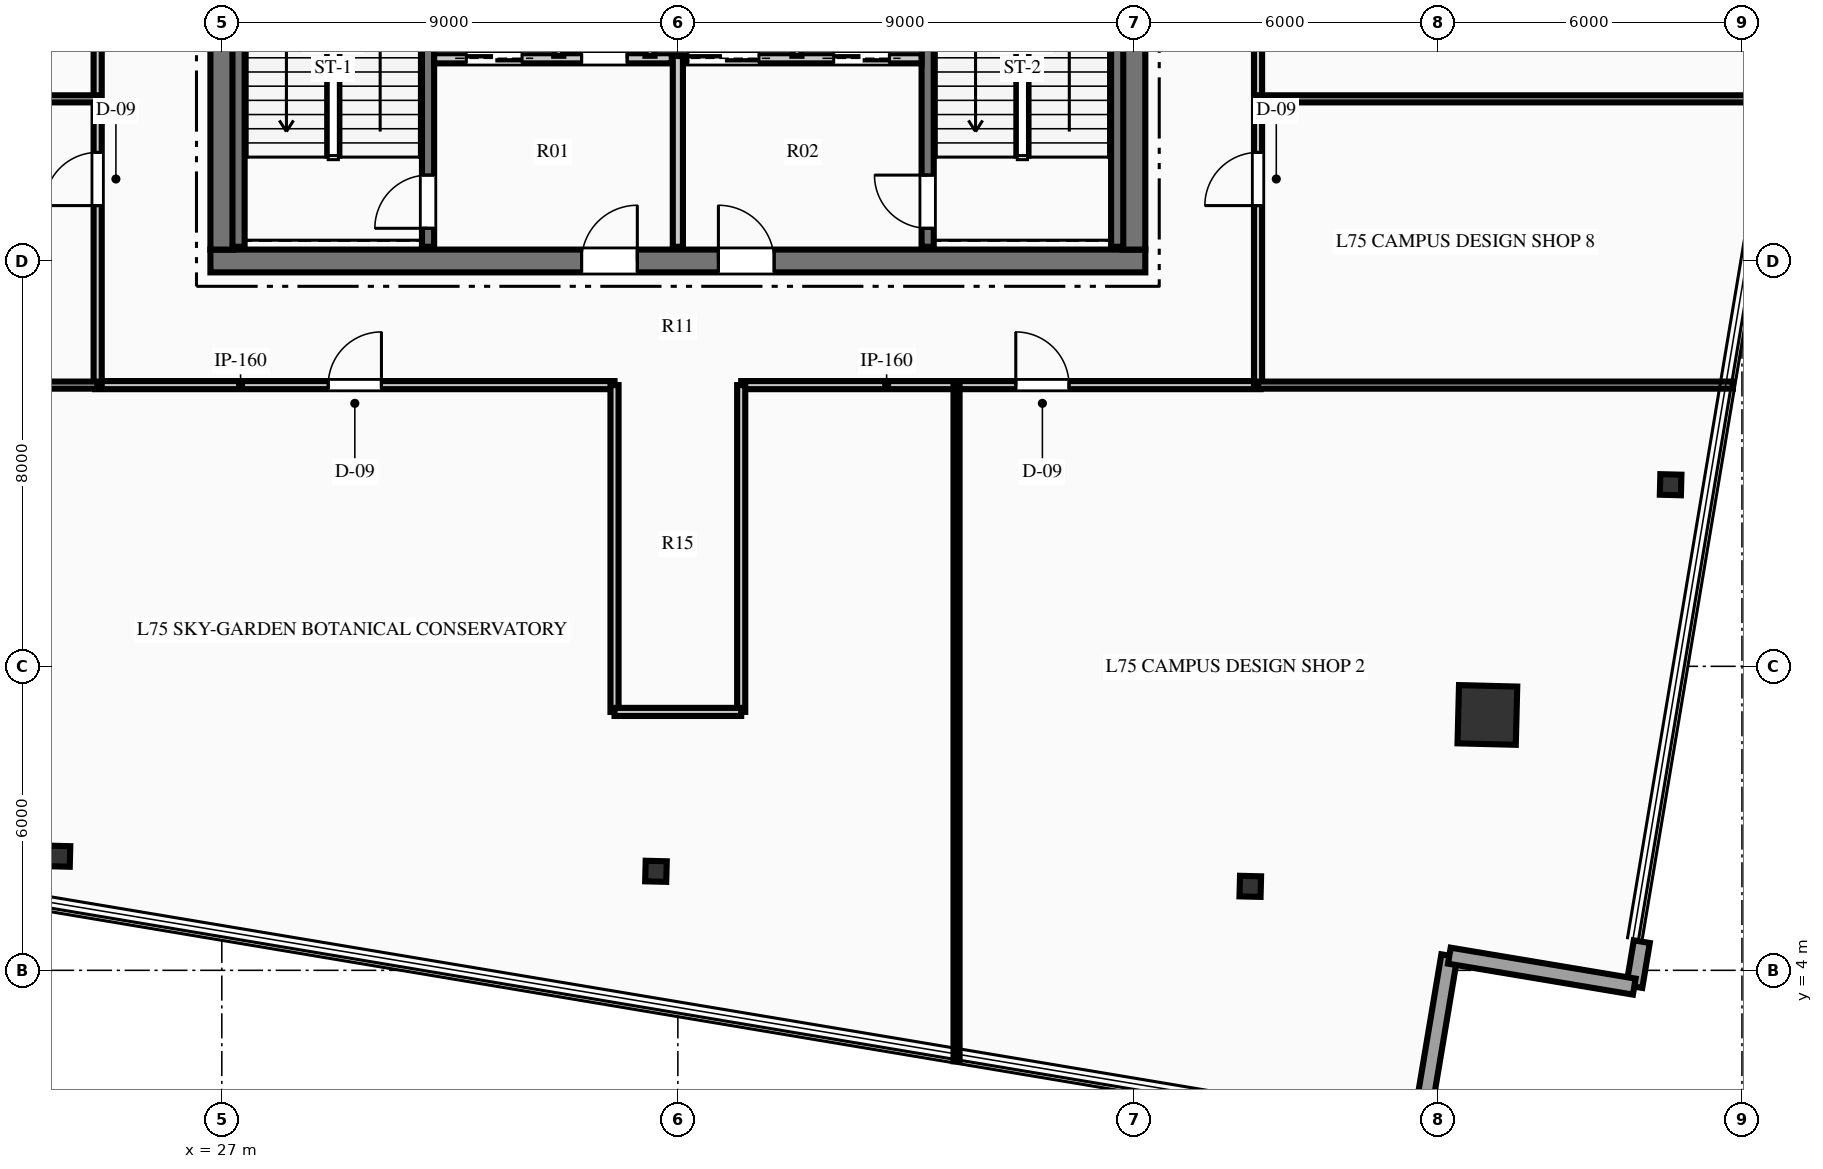
"""IFC4 building model, lengths in metres.
Left out: names, types, materials, properties, quantities, classifications, styles, units other than length and angle.
Written with IfcOpenShell. Run it as: python <this file> out.ifc"""

import sys

from ifc_helpers import new_model, si_unit, direction, frame, frame_2d, origin, origin_2d, place, context, subcontext, project, spatial, rectangle, hollow_rectangle, i_section, extrude, element, fill, save


model = new_model("IFC4")
c1 = context("Model", 3, precision=1e-05, world=origin(), true_north=direction((0.0, 1.0)))
c2 = subcontext(c1, "Body", "Model", "MODEL_VIEW")
j1 = project(units=[si_unit("LENGTHUNIT", "METRE"), si_unit("PLANEANGLEUNIT", "RADIAN")], contexts=[c1])
p1 = place(None, origin())
s1 = spatial("IfcSite", under=j1, at=p1, CompositionType="ELEMENT")
p2 = place(p1, origin())
s2 = spatial("IfcBuilding", under=s1, at=p2, CompositionType="ELEMENT")
p3 = place(p2, frame((0.0, 0.0, 298.2)))
s3 = spatial("IfcBuildingStorey", under=s2, at=p3, CompositionType="ELEMENT", Elevation=298.2)
p4 = place(p3, frame((26.775, 18.0, 0.0), z_axis=(0.0, 0.0, 1.0), x_axis=(1.0, 0.0, 0.0)))
e1 = element("IfcWall", 1, at=p4, inside=s3, PredefinedType="SHEAR", context=c2, shape_type="SweptSolid", body=[
    extrude(rectangle(XDim=18.45, YDim=0.45, at=frame_2d((9.225, 0.0))), origin(), (0.0, 0.0, 1.0), 4.5),
])
p5 = place(p4, frame((7.325, 0.0, 0.0)))
e2 = element("IfcOpeningElement", 2, at=p5, cuts=e1, PredefinedType="OPENING", context=c2, shape_type="SweptSolid", body=[
    extrude(rectangle(XDim=1.1, YDim=2.15, at=frame_2d((0.55, 1.075))), frame((0.0, 0.235, 0.0), z_axis=(0.0, -1.0, 0.0), x_axis=(1.0, 0.0, 0.0)), (0.0, 0.0, 1.0), 0.47),
])
p6 = place(p4, frame((10.025, 0.0, 0.0)))
e3 = element("IfcOpeningElement", 3, at=p6, cuts=e1, PredefinedType="OPENING", context=c2, shape_type="SweptSolid", body=[
    extrude(rectangle(XDim=1.1, YDim=2.15, at=frame_2d((0.55, 1.075))), frame((0.0, 0.235, 0.0), z_axis=(0.0, -1.0, 0.0), x_axis=(1.0, 0.0, 0.0)), (0.0, 0.0, 1.0), 0.47),
])
p7 = place(p3, frame((27.0, 18.225, 0.0), z_axis=(0.0, 0.0, 1.0), x_axis=(0.0, 1.0, 0.0)))
e4 = element("IfcWall", 4, at=p7, inside=s3, PredefinedType="SHEAR", context=c2, shape_type="SweptSolid", body=[
    extrude(rectangle(XDim=15.55, YDim=0.45, at=frame_2d((7.775, 0.0))), origin(), (0.0, 0.0, 1.0), 4.5),
])
p8 = place(p7, frame((10.015, 0.0, 0.0)))
e5 = element("IfcOpeningElement", 5, at=p8, cuts=e4, PredefinedType="OPENING", context=c2, shape_type="SweptSolid", body=[
    extrude(rectangle(XDim=1.4, YDim=2.2, at=frame_2d((0.7, 1.1))), frame((0.0, 0.235, 0.0), z_axis=(0.0, -1.0, 0.0), x_axis=(1.0, 0.0, 0.0)), (0.0, 0.0, 1.0), 0.47),
])
p9 = place(p3, frame((45.0, 18.225, 0.0), z_axis=(0.0, 0.0, 1.0), x_axis=(0.0, 1.0, 0.0)))
e6 = element("IfcWall", 6, at=p9, inside=s3, PredefinedType="SHEAR", context=c2, shape_type="SweptSolid", body=[
    extrude(rectangle(XDim=15.55, YDim=0.45, at=frame_2d((7.775, 0.0))), origin(), (0.0, 0.0, 1.0), 4.5),
])
p10 = place(p9, frame((10.015, 0.0, 0.0)))
e7 = element("IfcOpeningElement", 7, at=p10, cuts=e6, PredefinedType="OPENING", context=c2, shape_type="SweptSolid", body=[
    extrude(rectangle(XDim=1.4, YDim=2.2, at=frame_2d((0.7, 1.1))), frame((0.0, 0.235, 0.0), z_axis=(0.0, -1.0, 0.0), x_axis=(1.0, 0.0, 0.0)), (0.0, 0.0, 1.0), 0.47),
])
p11 = place(p3, frame((31.07, 18.28, 0.0), z_axis=(0.0, 0.0, 1.0), x_axis=(0.0, 1.0, 0.0)))
e8 = element("IfcWall", 8, at=p11, inside=s3, PredefinedType="SHEAR", context=c2, shape_type="SweptSolid", body=[
    extrude(rectangle(XDim=8.26, YDim=0.24, at=frame_2d((4.13, 0.0))), origin(), (0.0, 0.0, 1.0), 4.5),
])
p12 = place(p11, frame((0.365, 0.0, 0.0)))
e9 = element("IfcOpeningElement", 9, at=p12, cuts=e8, PredefinedType="OPENING", context=c2, shape_type="SweptSolid", body=[
    extrude(rectangle(XDim=1.05, YDim=2.15, at=frame_2d((0.525, 1.075))), frame((0.0, 0.13, 0.0), z_axis=(0.0, -1.0, 0.0), x_axis=(1.0, 0.0, 0.0)), (0.0, 0.0, 1.0), 0.26),
])
p13 = place(p3, frame((27.33, 18.28, 0.0), z_axis=(0.0, 0.0, 1.0), x_axis=(0.0, 1.0, 0.0)))
e10 = element("IfcWall", 10, at=p13, inside=s3, PredefinedType="SHEAR", context=c2, shape_type="SweptSolid", body=[
    extrude(rectangle(XDim=8.26, YDim=0.24, at=frame_2d((4.13, 0.0))), origin(), (0.0, 0.0, 1.0), 4.5),
])
p14 = place(p3, frame((40.93, 18.28, 0.0), z_axis=(0.0, 0.0, 1.0), x_axis=(0.0, 1.0, 0.0)))
e11 = element("IfcWall", 11, at=p14, inside=s3, PredefinedType="SHEAR", context=c2, shape_type="SweptSolid", body=[
    extrude(rectangle(XDim=8.26, YDim=0.24, at=frame_2d((4.13, 0.0))), origin(), (0.0, 0.0, 1.0), 4.5),
])
p15 = place(p14, frame((0.365, 0.0, 0.0)))
e12 = element("IfcOpeningElement", 12, at=p15, cuts=e11, PredefinedType="OPENING", context=c2, shape_type="SweptSolid", body=[
    extrude(rectangle(XDim=1.05, YDim=2.15, at=frame_2d((0.525, 1.075))), frame((0.0, 0.13, 0.0), z_axis=(0.0, -1.0, 0.0), x_axis=(1.0, 0.0, 0.0)), (0.0, 0.0, 1.0), 0.26),
])
p16 = place(p3, frame((44.67, 18.28, 0.0), z_axis=(0.0, 0.0, 1.0), x_axis=(0.0, 1.0, 0.0)))
e13 = element("IfcWall", 13, at=p16, inside=s3, PredefinedType="SHEAR", context=c2, shape_type="SweptSolid", body=[
    extrude(rectangle(XDim=8.26, YDim=0.24, at=frame_2d((4.13, 0.0))), origin(), (0.0, 0.0, 1.0), 4.5),
])
p17 = place(p3, frame((51.976, 9.04, 0.0), z_axis=(0.0, 0.0, 1.0), x_axis=(0.025304572866, 0.999679788028, 0.0)))
e14 = element("IfcColumn", 14, at=p17, inside=s3, PredefinedType="COLUMN", context=c2, shape_type="SweptSolid", body=[
    extrude(hollow_rectangle(XDim=1.15, YDim=1.15, WallThickness=0.05, at=origin_2d()), origin(), (0.0, 0.0, 1.0), 4.5),
])
for number, where, z_axis, x_axis in (
    (15, (55.592, 13.584, 0.0), (0.0, 0.0, 1.0), (0.025, 1.0, 0.0)),
    (16, (23.796, 6.252, 0.0), (0.0, 0.0, 1.0), (0.025, 1.0, 0.0)),
    (17, (35.568, 5.955, 0.0), (0.0, 0.0, 1.0), (0.025, 1.0, 0.0)),
    (18, (47.297, 5.658, 0.0), (0.0, 0.0, 1.0), (0.025, 1.0, 0.0)),
):
    element("IfcColumn", number, at=place(p3, frame(where, z_axis=z_axis, x_axis=x_axis)), inside=s3, PredefinedType="COLUMN", context=c2, shape_type="SweptSolid", body=[
        extrude(i_section(OverallWidth=0.406, OverallDepth=0.416, WebThickness=0.03, FlangeThickness=0.048, at=origin_2d()), origin(), (0.0, 0.0, 1.0), 4.5),
    ])
p18 = place(p3, frame((55.023, 4.566, 0.0), z_axis=(0.0, 0.0, 1.0), x_axis=(-0.164926823442, -0.98630580598, 0.0)))
e19 = element("IfcWall", 19, at=p18, inside=s3, PredefinedType="STANDARD", context=c2, shape_type="SweptSolid", body=[
    extrude(rectangle(XDim=0.9, YDim=0.32, at=frame_2d((0.45, 0.0))), origin(), (0.0, 0.0, 1.0), 4.24),
])
for number, where, z_axis, x_axis in (
    (20, (51.226, 4.289, 0.0), (0.0, 0.0, 1.0), (-0.165, -0.986, 0.0)),
    (21, (54.875, 3.679, 0.0), (0.0, 0.0, 1.0), (-0.986, 0.165, 0.0)),
):
    element("IfcWall", number, at=place(p3, frame(where, z_axis=z_axis, x_axis=x_axis)), inside=s3, PredefinedType="STANDARD", context=c2, shape_type="SweptSolid", body=[
        extrude(rectangle(XDim=3.7, YDim=0.32, at=frame_2d((1.85, 0.0))), origin(), (0.0, 0.0, 1.0), 4.24),
    ])
p19 = place(p3, frame((36.0, 18.28, 0.0), z_axis=(0.0, 0.0, 1.0), x_axis=(0.0, 1.0, 0.0)))
e22 = element("IfcWall", 22, at=p19, inside=s3, PredefinedType="PARTITIONING", context=c2, shape_type="SweptSolid", body=[
    extrude(rectangle(XDim=3.77, YDim=0.2, at=frame_2d((1.885, 0.0))), origin(), (0.0, 0.0, 1.0), 4.24),
])
p20 = place(p3, frame((31.19, 22.0, 0.0), z_axis=(0.0, 0.0, 1.0), x_axis=(1.0, 0.0, 0.0)))
e23 = element("IfcWall", 23, at=p20, inside=s3, PredefinedType="PARTITIONING", context=c2, shape_type="SweptSolid", body=[
    extrude(rectangle(XDim=4.69, YDim=0.2, at=frame_2d((2.345, 0.0))), origin(), (0.0, 0.0, 1.0), 4.24),
])
p21 = place(p20, frame((2.91, 0.0, 0.0)))
e24 = element("IfcOpeningElement", 24, at=p21, cuts=e23, PredefinedType="OPENING", context=c2, shape_type="SweptSolid", body=[
    extrude(rectangle(XDim=0.9, YDim=2.15, at=frame_2d((0.45, 1.075))), frame((0.0, 0.11, 0.0), z_axis=(0.0, -1.0, 0.0), x_axis=(1.0, 0.0, 0.0)), (0.0, 0.0, 1.0), 0.22),
])
p22 = place(p20, frame((0.635, 0.0, 0.0)))
e25 = element("IfcOpeningElement", 25, at=p22, cuts=e23, PredefinedType="OPENING", context=c2, shape_type="SweptSolid", body=[
    extrude(rectangle(XDim=1.1, YDim=2.15, at=frame_2d((0.55, 1.075))), frame((0.0, 0.11, 0.0), z_axis=(0.0, -1.0, 0.0), x_axis=(1.0, 0.0, 0.0)), (0.0, 0.0, 1.0), 0.22),
])
p23 = place(p3, frame((36.12, 22.0, 0.0), z_axis=(0.0, 0.0, 1.0), x_axis=(1.0, 0.0, 0.0)))
e26 = element("IfcWall", 26, at=p23, inside=s3, PredefinedType="PARTITIONING", context=c2, shape_type="SweptSolid", body=[
    extrude(rectangle(XDim=4.69, YDim=0.2, at=frame_2d((2.345, 0.0))), origin(), (0.0, 0.0, 1.0), 4.24),
])
p24 = place(p23, frame((2.955, 0.0, 0.0)))
e27 = element("IfcOpeningElement", 27, at=p24, cuts=e26, PredefinedType="OPENING", context=c2, shape_type="SweptSolid", body=[
    extrude(rectangle(XDim=1.1, YDim=2.15, at=frame_2d((0.55, 1.075))), frame((0.0, 0.11, 0.0), z_axis=(0.0, -1.0, 0.0), x_axis=(1.0, 0.0, 0.0)), (0.0, 0.0, 1.0), 0.22),
])
p25 = place(p23, frame((0.08, 0.0, 0.0)))
e28 = element("IfcOpeningElement", 28, at=p25, cuts=e26, PredefinedType="OPENING", context=c2, shape_type="SweptSolid", body=[
    extrude(rectangle(XDim=1.4, YDim=2.2, at=frame_2d((0.7, 1.1))), frame((0.0, 0.11, 0.0), z_axis=(0.0, -1.0, 0.0), x_axis=(1.0, 0.0, 0.0)), (0.0, 0.0, 1.0), 0.22),
])
for number, where, z_axis, x_axis in (
    (29, (33.65, 22.05, 0.0), (0.0, 0.0, 1.0), (0.0, 1.0, 0.0)),
    (30, (35.45, 22.05, 0.0), (0.0, 0.0, 1.0), (0.0, 1.0, 0.0)),
    (31, (38.35, 22.05, 0.0), (0.0, 0.0, 1.0), (0.0, 1.0, 0.0)),
):
    element("IfcWall", number, at=place(p3, frame(where, z_axis=z_axis, x_axis=x_axis)), inside=s3, PredefinedType="PARTITIONING", context=c2, shape_type="SweptSolid", body=[
        extrude(rectangle(XDim=2.6, YDim=0.18, at=frame_2d((1.3, 0.0))), origin(), (0.0, 0.0, 1.0), 4.24),
    ])
p26 = place(p3, frame((24.5, 15.55, 0.0), z_axis=(0.0, 0.0, 1.0), x_axis=(1.0, 0.0, 0.0)))
e32 = element("IfcWall", 32, at=p26, inside=s3, PredefinedType="PARTITIONING", context=c2, shape_type="SweptSolid", body=[
    extrude(rectangle(XDim=10.25, YDim=0.16, at=frame_2d((5.125, 0.0))), origin(), (0.0, 0.0, 1.0), 4.24),
])
p27 = place(p26, frame((4.6, 0.0, 0.0)))
e33 = element("IfcOpeningElement", 33, at=p27, cuts=e32, PredefinedType="OPENING", context=c2, shape_type="SweptSolid", body=[
    extrude(rectangle(XDim=1.05, YDim=2.15, at=frame_2d((0.525, 1.075))), frame((0.0, 0.09, 0.0), z_axis=(0.0, -1.0, 0.0), x_axis=(1.0, 0.0, 0.0)), (0.0, 0.0, 1.0), 0.18),
])
p28 = place(p3, frame((37.25, 15.55, 0.0), z_axis=(0.0, 0.0, 1.0), x_axis=(1.0, 0.0, 0.0)))
e34 = element("IfcWall", 34, at=p28, inside=s3, PredefinedType="PARTITIONING", context=c2, shape_type="SweptSolid", body=[
    extrude(rectangle(XDim=10.25, YDim=0.16, at=frame_2d((5.125, 0.0))), origin(), (0.0, 0.0, 1.0), 4.24),
])
p29 = place(p28, frame((5.419, 0.0, 0.0)))
e35 = element("IfcOpeningElement", 35, at=p29, cuts=e34, PredefinedType="OPENING", context=c2, shape_type="SweptSolid", body=[
    extrude(rectangle(XDim=1.05, YDim=2.15, at=frame_2d((0.525, 1.075))), frame((0.0, 0.09, 0.0), z_axis=(0.0, -1.0, 0.0), x_axis=(1.0, 0.0, 0.0)), (0.0, 0.0, 1.0), 0.18),
])
p30 = place(p3, frame((24.55, 15.55, 0.0), z_axis=(0.0, 0.0, 1.0), x_axis=(0.0, 1.0, 0.0)))
e36 = element("IfcWall", 36, at=p30, inside=s3, PredefinedType="PARTITIONING", context=c2, shape_type="SweptSolid", body=[
    extrude(rectangle(XDim=9.2, YDim=0.16, at=frame_2d((4.6, 0.0))), origin(), (0.0, 0.0, 1.0), 4.24),
])
p31 = place(p30, frame((3.543, 0.0, 0.0)))
e37 = element("IfcOpeningElement", 37, at=p31, cuts=e36, PredefinedType="OPENING", context=c2, shape_type="SweptSolid", body=[
    extrude(rectangle(XDim=1.05, YDim=2.15, at=frame_2d((0.525, 1.075))), frame((0.0, 0.09, 0.0), z_axis=(0.0, -1.0, 0.0), x_axis=(1.0, 0.0, 0.0)), (0.0, 0.0, 1.0), 0.18),
])
p32 = place(p3, frame((47.45, 15.55, 0.0), z_axis=(0.0, 0.0, 1.0), x_axis=(0.0, 1.0, 0.0)))
e38 = element("IfcWall", 38, at=p32, inside=s3, PredefinedType="PARTITIONING", context=c2, shape_type="SweptSolid", body=[
    extrude(rectangle(XDim=9.2, YDim=0.16, at=frame_2d((4.6, 0.0))), origin(), (0.0, 0.0, 1.0), 4.24),
])
p33 = place(p32, frame((3.543, 0.0, 0.0)))
e39 = element("IfcOpeningElement", 39, at=p33, cuts=e38, PredefinedType="OPENING", context=c2, shape_type="SweptSolid", body=[
    extrude(rectangle(XDim=1.05, YDim=2.15, at=frame_2d((0.525, 1.075))), frame((0.0, 0.09, 0.0), z_axis=(0.0, -1.0, 0.0), x_axis=(1.0, 0.0, 0.0)), (0.0, 0.0, 1.0), 0.18),
])
for number, where, z_axis, x_axis in (
    (40, (34.75, 9.1, 0.0), (0.0, 0.0, 1.0), (0.0, 1.0, 0.0)),
    (41, (37.25, 9.1, 0.0), (0.0, 0.0, 1.0), (0.0, 1.0, 0.0)),
):
    element("IfcWall", number, at=place(p3, frame(where, z_axis=z_axis, x_axis=x_axis)), inside=s3, PredefinedType="PARTITIONING", context=c2, shape_type="SweptSolid", body=[
        extrude(rectangle(XDim=6.45, YDim=0.16, at=frame_2d((3.225, 0.0))), origin(), (0.0, 0.0, 1.0), 4.24),
    ])
p34 = place(p3, frame((34.75, 9.1, 0.0), z_axis=(0.0, 0.0, 1.0), x_axis=(1.0, 0.0, 0.0)))
e42 = element("IfcWall", 42, at=p34, inside=s3, PredefinedType="PARTITIONING", context=c2, shape_type="SweptSolid", body=[
    extrude(rectangle(XDim=2.5, YDim=0.16, at=frame_2d((1.25, 0.0))), origin(), (0.0, 0.0, 1.0), 4.24),
])
p35 = place(p3, frame((11.682, 15.55, 0.0), z_axis=(0.0, 0.0, 1.0), x_axis=(1.0, 0.0, 0.0)))
e43 = element("IfcWall", 43, at=p35, inside=s3, PredefinedType="PARTITIONING", context=c2, shape_type="SweptSolid", body=[
    extrude(rectangle(XDim=12.868, YDim=0.14, at=frame_2d((6.434, 0.0))), origin(), (0.0, 0.0, 1.0), 3.829),
])
p36 = place(p3, frame((47.45, 15.55, 0.0), z_axis=(0.0, 0.0, 1.0), x_axis=(1.0, 0.0, 0.0)))
e44 = element("IfcWall", 44, at=p36, inside=s3, PredefinedType="PARTITIONING", context=c2, shape_type="SweptSolid", body=[
    extrude(rectangle(XDim=9.371, YDim=0.14, at=frame_2d((4.686, 0.0))), origin(), (0.0, 0.0, 1.0), 3.618),
])
p37 = place(p3, frame((41.5, 2.206, 0.0), z_axis=(0.0, 0.0, 1.0), x_axis=(0.0, 1.0, 0.0)))
e45 = element("IfcWall", 45, at=p37, inside=s3, PredefinedType="PARTITIONING", context=c2, shape_type="SweptSolid", body=[
    extrude(rectangle(XDim=13.344, YDim=0.12, at=frame_2d((6.672, 0.0))), origin(), (0.0, 0.0, 1.0), 4.24),
])
p38 = place(p3, frame((12.627, 21.2, 0.0), z_axis=(0.0, 0.0, 1.0), x_axis=(1.0, 0.0, 0.0)))
e46 = element("IfcWall", 46, at=p38, inside=s3, PredefinedType="PARTITIONING", context=c2, shape_type="SweptSolid", body=[
    extrude(rectangle(XDim=11.923, YDim=0.14, at=frame_2d((5.961, 0.0))), origin(), (0.0, 0.0, 1.0), 4.24),
])
p39 = place(p3, frame((47.45, 21.2, 0.0), z_axis=(0.0, 0.0, 1.0), x_axis=(1.0, 0.0, 0.0)))
e47 = element("IfcWall", 47, at=p39, inside=s3, PredefinedType="PARTITIONING", context=c2, shape_type="SweptSolid", body=[
    extrude(rectangle(XDim=10.316, YDim=0.14, at=frame_2d((5.158, 0.0))), origin(), (0.0, 0.0, 1.0), 4.24),
])
p40 = place(p12, origin())
e48 = element("IfcDoor", 48, at=p40, inside=s3, OperationType="SINGLE_SWING_LEFT", PredefinedType="DOOR", context=c2, shape_type="SweptSolid", body=[
    extrude(rectangle(XDim=1.05, YDim=2.15, at=frame_2d((0.525, 1.075))), frame((0.0, 0.025, 0.0), z_axis=(0.0, -1.0, 0.0), x_axis=(1.0, 0.0, 0.0)), (0.0, 0.0, 1.0), 0.05),
])
fill(e9, e48)
p41 = place(p15, origin())
e49 = element("IfcDoor", 49, at=p41, inside=s3, OperationType="SINGLE_SWING_RIGHT", PredefinedType="DOOR", context=c2, shape_type="SweptSolid", body=[
    extrude(rectangle(XDim=1.05, YDim=2.15, at=frame_2d((0.525, 1.075))), frame((0.0, 0.025, 0.0), z_axis=(0.0, -1.0, 0.0), x_axis=(1.0, 0.0, 0.0)), (0.0, 0.0, 1.0), 0.05),
])
fill(e12, e49)
p42 = place(p5, origin())
e50 = element("IfcDoor", 50, at=p42, inside=s3, OperationType="SINGLE_SWING_RIGHT", PredefinedType="DOOR", context=c2, shape_type="SweptSolid", body=[
    extrude(rectangle(XDim=1.1, YDim=2.15, at=frame_2d((0.55, 1.075))), frame((0.0, 0.025, 0.0), z_axis=(0.0, -1.0, 0.0), x_axis=(1.0, 0.0, 0.0)), (0.0, 0.0, 1.0), 0.05),
])
fill(e2, e50)
p43 = place(p6, origin())
e51 = element("IfcDoor", 51, at=p43, inside=s3, OperationType="SINGLE_SWING_LEFT", PredefinedType="DOOR", context=c2, shape_type="SweptSolid", body=[
    extrude(rectangle(XDim=1.1, YDim=2.15, at=frame_2d((0.55, 1.075))), frame((0.0, 0.025, 0.0), z_axis=(0.0, -1.0, 0.0), x_axis=(1.0, 0.0, 0.0)), (0.0, 0.0, 1.0), 0.05),
])
fill(e3, e51)
p44 = place(p21, origin())
e52 = element("IfcDoor", 52, at=p44, inside=s3, OperationType="SINGLE_SWING_RIGHT", PredefinedType="DOOR", context=c2, shape_type="SweptSolid", body=[
    extrude(rectangle(XDim=0.9, YDim=2.15, at=frame_2d((0.45, 1.075))), frame((0.0, 0.025, 0.0), z_axis=(0.0, -1.0, 0.0), x_axis=(1.0, 0.0, 0.0)), (0.0, 0.0, 1.0), 0.05),
])
fill(e24, e52)
p45 = place(p27, origin())
e53 = element("IfcDoor", 53, at=p45, inside=s3, OperationType="SINGLE_SWING_RIGHT", PredefinedType="DOOR", context=c2, shape_type="SweptSolid", body=[
    extrude(rectangle(XDim=1.05, YDim=2.15, at=frame_2d((0.525, 1.075))), frame((0.0, 0.025, 0.0), z_axis=(0.0, -1.0, 0.0), x_axis=(1.0, 0.0, 0.0)), (0.0, 0.0, 1.0), 0.05),
])
fill(e33, e53)
p46 = place(p29, origin())
e54 = element("IfcDoor", 54, at=p46, inside=s3, OperationType="SINGLE_SWING_LEFT", PredefinedType="DOOR", context=c2, shape_type="SweptSolid", body=[
    extrude(rectangle(XDim=1.05, YDim=2.15, at=frame_2d((0.525, 1.075))), frame((0.0, 0.025, 0.0), z_axis=(0.0, -1.0, 0.0), x_axis=(1.0, 0.0, 0.0)), (0.0, 0.0, 1.0), 0.05),
])
fill(e35, e54)
p47 = place(p31, origin())
e55 = element("IfcDoor", 55, at=p47, inside=s3, OperationType="SINGLE_SWING_LEFT", PredefinedType="DOOR", context=c2, shape_type="SweptSolid", body=[
    extrude(rectangle(XDim=1.05, YDim=2.15, at=frame_2d((0.525, 1.075))), frame((0.0, 0.025, 0.0), z_axis=(0.0, -1.0, 0.0), x_axis=(1.0, 0.0, 0.0)), (0.0, 0.0, 1.0), 0.05),
])
fill(e37, e55)
p48 = place(p33, origin())
e56 = element("IfcDoor", 56, at=p48, inside=s3, OperationType="SINGLE_SWING_LEFT", PredefinedType="DOOR", context=c2, shape_type="SweptSolid", body=[
    extrude(rectangle(XDim=1.05, YDim=2.15, at=frame_2d((0.525, 1.075))), frame((0.0, 0.025, 0.0), z_axis=(0.0, -1.0, 0.0), x_axis=(1.0, 0.0, 0.0)), (0.0, 0.0, 1.0), 0.05),
])
fill(e39, e56)
p49 = place(p22, origin())
e57 = element("IfcDoor", 57, at=p49, inside=s3, OperationType="SLIDING_TO_LEFT", PredefinedType="DOOR", context=c2, shape_type="SweptSolid", body=[
    extrude(rectangle(XDim=1.1, YDim=2.15, at=frame_2d((0.55, 1.075))), frame((0.0, 0.025, 0.0), z_axis=(0.0, -1.0, 0.0), x_axis=(1.0, 0.0, 0.0)), (0.0, 0.0, 1.0), 0.05),
])
fill(e25, e57)
p50 = place(p24, origin())
e58 = element("IfcDoor", 58, at=p50, inside=s3, OperationType="SLIDING_TO_LEFT", PredefinedType="DOOR", context=c2, shape_type="SweptSolid", body=[
    extrude(rectangle(XDim=1.1, YDim=2.15, at=frame_2d((0.55, 1.075))), frame((0.0, 0.025, 0.0), z_axis=(0.0, -1.0, 0.0), x_axis=(1.0, 0.0, 0.0)), (0.0, 0.0, 1.0), 0.05),
])
fill(e27, e58)
p51 = place(p25, origin())
e59 = element("IfcDoor", 59, at=p51, inside=s3, OperationType="SLIDING_TO_LEFT", PredefinedType="DOOR", context=c2, shape_type="SweptSolid", body=[
    extrude(rectangle(XDim=1.4, YDim=2.2, at=frame_2d((0.7, 1.1))), frame((0.0, 0.025, 0.0), z_axis=(0.0, -1.0, 0.0), x_axis=(1.0, 0.0, 0.0)), (0.0, 0.0, 1.0), 0.05),
])
fill(e28, e59)
save(model, sys.argv[1])
